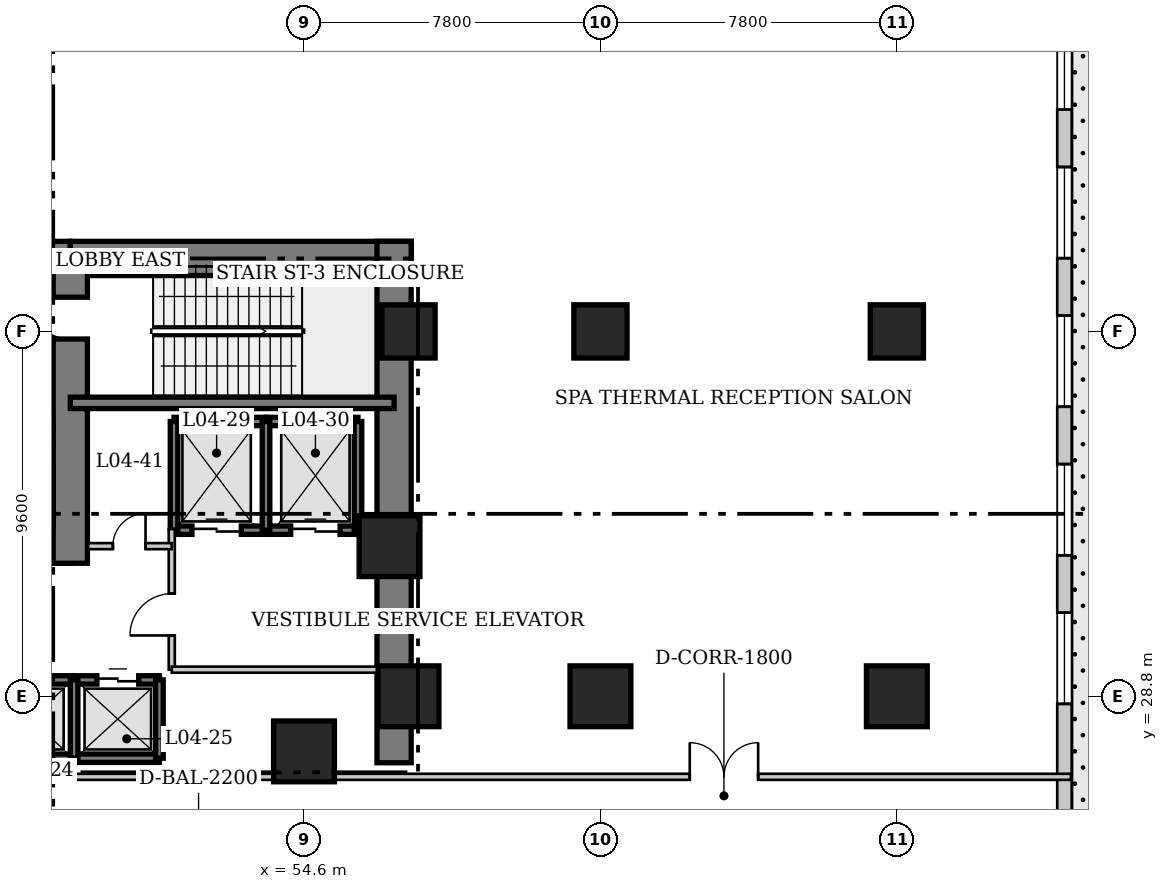
"""IFC4 building model, lengths in metres.
Left out: names, types, materials, properties, quantities, classifications, styles, units other than length and angle.
Written with IfcOpenShell. Run it as: python <this file> out.ifc"""

import sys

from ifc_helpers import new_model, si_unit, direction, frame, frame_2d, origin, origin_2d, place, context, subcontext, project, spatial, rectangle, extrude, element, fill, save


model = new_model("IFC4")
c1 = context("Model", 3, precision=1e-05, world=origin(), true_north=direction((0.0, 1.0)))
c2 = subcontext(c1, "Body", "Model", "MODEL_VIEW")
j1 = project(units=[si_unit("LENGTHUNIT", "METRE"), si_unit("PLANEANGLEUNIT", "RADIAN")], contexts=[c1])
p1 = place(None, origin())
s1 = spatial("IfcSite", under=j1, at=p1, CompositionType="ELEMENT")
p2 = place(p1, origin())
s2 = spatial("IfcBuilding", under=s1, at=p2, CompositionType="ELEMENT")
p3 = place(p2, frame((0.0, 0.0, 20.8)))
s3 = spatial("IfcBuildingStorey", under=s2, at=p3, CompositionType="ELEMENT", Elevation=20.8)
p4 = place(p3, frame((35.85, 40.32, 0.0), z_axis=(0.0, 0.0, 1.0), x_axis=(1.0, 0.0, 0.0)))
e1 = element("IfcWall", 1, at=p4, inside=s3, PredefinedType="SHEAR", context=c2, shape_type="SweptSolid", body=[
    extrude(rectangle(XDim=12.6, YDim=0.9, at=frame_2d((6.3, 0.0))), origin(), (0.0, 0.0, 1.0), 5.2),
])
p5 = place(p3, frame((48.45, 40.32, 0.0), z_axis=(0.0, 0.0, 1.0), x_axis=(1.0, 0.0, 0.0)))
e2 = element("IfcWall", 2, at=p5, inside=s3, PredefinedType="SHEAR", context=c2, shape_type="SweptSolid", body=[
    extrude(rectangle(XDim=8.97, YDim=0.9, at=frame_2d((4.485, 0.0))), origin(), (0.0, 0.0, 1.0), 5.2),
])
p6 = place(p3, frame((56.97, 27.05, 0.0), z_axis=(0.0, 0.0, 1.0), x_axis=(0.0, 1.0, 0.0)))
e3 = element("IfcWall", 3, at=p6, inside=s3, PredefinedType="SHEAR", context=c2, shape_type="SweptSolid", body=[
    extrude(rectangle(XDim=13.72, YDim=0.9, at=frame_2d((6.86, 0.0))), origin(), (0.0, 0.0, 1.0), 5.2),
])
p7 = place(p3, frame((45.81, 32.75, 0.0), z_axis=(0.0, 0.0, 1.0), x_axis=(1.0, 0.0, 0.0)))
e4 = element("IfcWall", 4, at=p7, inside=s3, PredefinedType="SHEAR", context=c2, shape_type="SweptSolid", body=[
    extrude(rectangle(XDim=2.64, YDim=0.9, at=frame_2d((1.32, 0.0))), origin(), (0.0, 0.0, 1.0), 5.2),
])
p8 = place(p3, frame((48.45, 32.3, 0.0), z_axis=(0.0, 0.0, 1.0), x_axis=(0.0, 1.0, 0.0)))
e5 = element("IfcWall", 5, at=p8, inside=s3, PredefinedType="SHEAR", context=c2, shape_type="SweptSolid", body=[
    extrude(rectangle(XDim=8.02, YDim=0.9, at=frame_2d((4.01, 0.0))), origin(), (0.0, 0.0, 1.0), 5.2),
])
p9 = place(p8, frame((5.9, 0.0, 0.0)))
e6 = element("IfcOpeningElement", 6, at=p9, cuts=e5, PredefinedType="OPENING", context=c2, shape_type="SweptSolid", body=[
    extrude(rectangle(XDim=1.1, YDim=2.15, at=frame_2d((0.55, 1.075))), frame((0.0, 0.46, 0.0), z_axis=(0.0, -1.0, 0.0), x_axis=(1.0, 0.0, 0.0)), (0.0, 0.0, 1.0), 0.92),
])
p10 = place(p3, frame((48.45, 36.52, 0.0), z_axis=(0.0, 0.0, 1.0), x_axis=(1.0, 0.0, 0.0)))
e7 = element("IfcWall", 7, at=p10, inside=s3, PredefinedType="SHEAR", context=c2, shape_type="SweptSolid", body=[
    extrude(rectangle(XDim=8.52, YDim=0.3, at=frame_2d((4.26, 0.0))), origin(), (0.0, 0.0, 1.0), 5.2),
])
p11 = place(p3, frame((62.4, 28.8, 0.0), z_axis=(0.0, 0.0, 1.0), x_axis=(1.0, 0.0, 0.0)))
e8 = element("IfcColumn", 8, at=p11, inside=s3, PredefinedType="COLUMN", context=c2, shape_type="SweptSolid", body=[
    extrude(rectangle(XDim=1.6, YDim=1.6, at=origin_2d()), origin(), (0.0, 0.0, 1.0), 5.2),
])
p12 = place(p3, frame((62.4, 38.4, 0.0), z_axis=(0.0, 0.0, 1.0), x_axis=(1.0, 0.0, 0.0)))
e9 = element("IfcColumn", 9, at=p12, inside=s3, PredefinedType="COLUMN", context=c2, shape_type="SweptSolid", body=[
    extrude(rectangle(XDim=1.4, YDim=1.4, at=origin_2d()), origin(), (0.0, 0.0, 1.0), 5.2),
])
p13 = place(p3, frame((70.2, 28.8, 0.0), z_axis=(0.0, 0.0, 1.0), x_axis=(1.0, 0.0, 0.0)))
e10 = element("IfcColumn", 10, at=p13, inside=s3, PredefinedType="COLUMN", context=c2, shape_type="SweptSolid", body=[
    extrude(rectangle(XDim=1.6, YDim=1.6, at=origin_2d()), origin(), (0.0, 0.0, 1.0), 5.2),
])
p14 = place(p3, frame((70.2, 38.4, 0.0), z_axis=(0.0, 0.0, 1.0), x_axis=(1.0, 0.0, 0.0)))
e11 = element("IfcColumn", 11, at=p14, inside=s3, PredefinedType="COLUMN", context=c2, shape_type="SweptSolid", body=[
    extrude(rectangle(XDim=1.4, YDim=1.4, at=origin_2d()), origin(), (0.0, 0.0, 1.0), 5.2),
])
p15 = place(p3, frame((57.35, 28.8, 0.0), z_axis=(0.0, 0.0, 1.0), x_axis=(1.0, 0.0, 0.0)))
e12 = element("IfcColumn", 12, at=p15, inside=s3, PredefinedType="COLUMN", context=c2, shape_type="SweptSolid", body=[
    extrude(rectangle(XDim=1.6, YDim=1.6, at=origin_2d()), origin(), (0.0, 0.0, 1.0), 5.2),
])
p16 = place(p3, frame((57.35, 38.4, 0.0), z_axis=(0.0, 0.0, 1.0), x_axis=(1.0, 0.0, 0.0)))
e13 = element("IfcColumn", 13, at=p16, inside=s3, PredefinedType="COLUMN", context=c2, shape_type="SweptSolid", body=[
    extrude(rectangle(XDim=1.4, YDim=1.4, at=origin_2d()), origin(), (0.0, 0.0, 1.0), 5.2),
])
for number, where, z_axis, x_axis in (
    (14, (54.6, 27.35, 0.0), (0.0, 0.0, 1.0), (1.0, 0.0, 0.0)),
    (15, (56.85, 32.75, 0.0), (0.0, 0.0, 1.0), (1.0, 0.0, 0.0)),
):
    element("IfcColumn", number, at=place(p3, frame(where, z_axis=z_axis, x_axis=x_axis)), inside=s3, PredefinedType="COLUMN", context=c2, shape_type="SweptSolid", body=[
        extrude(rectangle(XDim=1.6, YDim=1.6, at=origin_2d()), origin(), (0.0, 0.0, 1.0), 5.2),
    ])
p17 = place(p3, frame((74.61, 12.21, 0.0), z_axis=(0.0, 0.0, 1.0), x_axis=(0.0, 1.0, 0.0)))
e16 = element("IfcWall", 16, at=p17, inside=s3, PredefinedType="SOLIDWALL", context=c2, shape_type="SweptSolid", body=[
    extrude(rectangle(XDim=35.18, YDim=0.38, at=frame_2d((17.59, 0.0))), origin(), (0.0, 0.0, 1.0), 4.94),
])
p18 = place(p17, frame((0.754, 0.0, 0.75)))
e17 = element("IfcOpeningElement", 17, at=p18, cuts=e16, PredefinedType="OPENING", context=c2, shape_type="SweptSolid", body=[
    extrude(rectangle(XDim=2.4, YDim=2.2, at=frame_2d((1.2, 1.1))), frame((0.0, 0.2, 0.0), z_axis=(0.0, -1.0, 0.0), x_axis=(1.0, 0.0, 0.0)), (0.0, 0.0, 1.0), 0.4),
])
p19 = place(p17, frame((4.663, 0.0, 0.75)))
e18 = element("IfcOpeningElement", 18, at=p19, cuts=e16, PredefinedType="OPENING", context=c2, shape_type="SweptSolid", body=[
    extrude(rectangle(XDim=2.4, YDim=2.2, at=frame_2d((1.2, 1.1))), frame((0.0, 0.2, 0.0), z_axis=(0.0, -1.0, 0.0), x_axis=(1.0, 0.0, 0.0)), (0.0, 0.0, 1.0), 0.4),
])
p20 = place(p17, frame((8.572, 0.0, 0.75)))
e19 = element("IfcOpeningElement", 19, at=p20, cuts=e16, PredefinedType="OPENING", context=c2, shape_type="SweptSolid", body=[
    extrude(rectangle(XDim=2.4, YDim=2.2, at=frame_2d((1.2, 1.1))), frame((0.0, 0.2, 0.0), z_axis=(0.0, -1.0, 0.0), x_axis=(1.0, 0.0, 0.0)), (0.0, 0.0, 1.0), 0.4),
])
p21 = place(p17, frame((16.39, 0.0, 0.75)))
e20 = element("IfcOpeningElement", 20, at=p21, cuts=e16, PredefinedType="OPENING", context=c2, shape_type="SweptSolid", body=[
    extrude(rectangle(XDim=2.4, YDim=2.2, at=frame_2d((1.2, 1.1))), frame((0.0, 0.2, 0.0), z_axis=(0.0, -1.0, 0.0), x_axis=(1.0, 0.0, 0.0)), (0.0, 0.0, 1.0), 0.4),
])
p22 = place(p17, frame((20.299, 0.0, 0.75)))
e21 = element("IfcOpeningElement", 21, at=p22, cuts=e16, PredefinedType="OPENING", context=c2, shape_type="SweptSolid", body=[
    extrude(rectangle(XDim=2.4, YDim=2.2, at=frame_2d((1.2, 1.1))), frame((0.0, 0.2, 0.0), z_axis=(0.0, -1.0, 0.0), x_axis=(1.0, 0.0, 0.0)), (0.0, 0.0, 1.0), 0.4),
])
p23 = place(p17, frame((24.208, 0.0, 0.75)))
e22 = element("IfcOpeningElement", 22, at=p23, cuts=e16, PredefinedType="OPENING", context=c2, shape_type="SweptSolid", body=[
    extrude(rectangle(XDim=2.4, YDim=2.2, at=frame_2d((1.2, 1.1))), frame((0.0, 0.2, 0.0), z_axis=(0.0, -1.0, 0.0), x_axis=(1.0, 0.0, 0.0)), (0.0, 0.0, 1.0), 0.4),
])
p24 = place(p17, frame((28.117, 0.0, 0.75)))
e23 = element("IfcOpeningElement", 23, at=p24, cuts=e16, PredefinedType="OPENING", context=c2, shape_type="SweptSolid", body=[
    extrude(rectangle(XDim=2.4, YDim=2.2, at=frame_2d((1.2, 1.1))), frame((0.0, 0.2, 0.0), z_axis=(0.0, -1.0, 0.0), x_axis=(1.0, 0.0, 0.0)), (0.0, 0.0, 1.0), 0.4),
])
p25 = place(p17, frame((32.026, 0.0, 0.75)))
e24 = element("IfcOpeningElement", 24, at=p25, cuts=e16, PredefinedType="OPENING", context=c2, shape_type="SweptSolid", body=[
    extrude(rectangle(XDim=2.4, YDim=2.2, at=frame_2d((1.2, 1.1))), frame((0.0, 0.2, 0.0), z_axis=(0.0, -1.0, 0.0), x_axis=(1.0, 0.0, 0.0)), (0.0, 0.0, 1.0), 0.4),
])
p26 = place(p3, frame((46.25, 29.23, 0.0), z_axis=(0.0, 0.0, 1.0), x_axis=(1.0, 0.0, 0.0)))
e25 = element("IfcWall", 25, at=p26, inside=s3, PredefinedType="SHEAR", context=c2, shape_type="SweptSolid", body=[
    extrude(rectangle(XDim=2.3, YDim=0.22, at=frame_2d((1.15, 0.0))), origin(), (0.0, 0.0, 1.0), 5.2),
])
p27 = place(p26, frame((0.6, 0.0, 0.0)))
e26 = element("IfcOpeningElement", 26, at=p27, cuts=e25, PredefinedType="OPENING", context=c2, shape_type="SweptSolid", body=[
    extrude(rectangle(XDim=1.1, YDim=2.15, at=frame_2d((0.55, 1.075))), frame((0.0, 0.12, 0.0), z_axis=(0.0, -1.0, 0.0), x_axis=(1.0, 0.0, 0.0)), (0.0, 0.0, 1.0), 0.24),
])
p28 = place(p3, frame((46.25, 27.17, 0.0), z_axis=(0.0, 0.0, 1.0), x_axis=(1.0, 0.0, 0.0)))
e27 = element("IfcWall", 27, at=p28, inside=s3, PredefinedType="SHEAR", context=c2, shape_type="SweptSolid", body=[
    extrude(rectangle(XDim=2.3, YDim=0.22, at=frame_2d((1.15, 0.0))), origin(), (0.0, 0.0, 1.0), 5.2),
])
p29 = place(p3, frame((48.55, 29.23, 0.0), z_axis=(0.0, 0.0, 1.0), x_axis=(1.0, 0.0, 0.0)))
e28 = element("IfcWall", 28, at=p29, inside=s3, PredefinedType="SHEAR", context=c2, shape_type="SweptSolid", body=[
    extrude(rectangle(XDim=2.245, YDim=0.22, at=frame_2d((1.123, 0.0))), origin(), (0.0, 0.0, 1.0), 5.2),
])
p30 = place(p29, frame((0.6, 0.0, 0.0)))
e29 = element("IfcOpeningElement", 29, at=p30, cuts=e28, PredefinedType="OPENING", context=c2, shape_type="SweptSolid", body=[
    extrude(rectangle(XDim=1.1, YDim=2.15, at=frame_2d((0.55, 1.075))), frame((0.0, 0.12, 0.0), z_axis=(0.0, -1.0, 0.0), x_axis=(1.0, 0.0, 0.0)), (0.0, 0.0, 1.0), 0.24),
])
p31 = place(p3, frame((48.55, 27.17, 0.0), z_axis=(0.0, 0.0, 1.0), x_axis=(1.0, 0.0, 0.0)))
e30 = element("IfcWall", 30, at=p31, inside=s3, PredefinedType="SHEAR", context=c2, shape_type="SweptSolid", body=[
    extrude(rectangle(XDim=2.245, YDim=0.22, at=frame_2d((1.123, 0.0))), origin(), (0.0, 0.0, 1.0), 5.2),
])
for number, where, z_axis, x_axis in (
    (31, (48.55, 27.17, 0.0), (0.0, 0.0, 1.0), (0.0, 1.0, 0.0)),
    (32, (50.795, 27.17, 0.0), (0.0, 0.0, 1.0), (0.0, 1.0, 0.0)),
):
    element("IfcWall", number, at=place(p3, frame(where, z_axis=z_axis, x_axis=x_axis)), inside=s3, PredefinedType="SHEAR", context=c2, shape_type="SweptSolid", body=[
        extrude(rectangle(XDim=2.06, YDim=0.2, at=frame_2d((1.03, 0.0))), origin(), (0.0, 0.0, 1.0), 5.2),
    ])
p32 = place(p3, frame((51.18, 36.03, 0.0), z_axis=(0.0, 0.0, 1.0), x_axis=(1.0, 0.0, 0.0)))
e33 = element("IfcWall", 33, at=p32, inside=s3, PredefinedType="SHEAR", context=c2, shape_type="SweptSolid", body=[
    extrude(rectangle(XDim=2.42, YDim=0.22, at=frame_2d((1.21, 0.0))), origin(), (0.0, 0.0, 1.0), 5.2),
])
p33 = place(p3, frame((51.18, 33.17, 0.0), z_axis=(0.0, 0.0, 1.0), x_axis=(1.0, 0.0, 0.0)))
e34 = element("IfcWall", 34, at=p33, inside=s3, PredefinedType="SHEAR", context=c2, shape_type="SweptSolid", body=[
    extrude(rectangle(XDim=2.42, YDim=0.22, at=frame_2d((1.21, 0.0))), origin(), (0.0, 0.0, 1.0), 5.2),
])
p34 = place(p33, frame((0.47, 0.0, 0.0)))
e35 = element("IfcOpeningElement", 35, at=p34, cuts=e34, PredefinedType="OPENING", context=c2, shape_type="SweptSolid", body=[
    extrude(rectangle(XDim=1.3, YDim=2.15, at=frame_2d((0.65, 1.075))), frame((0.0, 0.12, 0.0), z_axis=(0.0, -1.0, 0.0), x_axis=(1.0, 0.0, 0.0)), (0.0, 0.0, 1.0), 0.24),
])
p35 = place(p3, frame((51.18, 33.17, 0.0), z_axis=(0.0, 0.0, 1.0), x_axis=(0.0, 1.0, 0.0)))
e36 = element("IfcWall", 36, at=p35, inside=s3, PredefinedType="SHEAR", context=c2, shape_type="SweptSolid", body=[
    extrude(rectangle(XDim=2.86, YDim=0.2, at=frame_2d((1.43, 0.0))), origin(), (0.0, 0.0, 1.0), 5.2),
])
p36 = place(p3, frame((53.6, 36.03, 0.0), z_axis=(0.0, 0.0, 1.0), x_axis=(1.0, 0.0, 0.0)))
e37 = element("IfcWall", 37, at=p36, inside=s3, PredefinedType="SHEAR", context=c2, shape_type="SweptSolid", body=[
    extrude(rectangle(XDim=2.42, YDim=0.22, at=frame_2d((1.21, 0.0))), origin(), (0.0, 0.0, 1.0), 5.2),
])
p37 = place(p3, frame((53.6, 33.17, 0.0), z_axis=(0.0, 0.0, 1.0), x_axis=(1.0, 0.0, 0.0)))
e38 = element("IfcWall", 38, at=p37, inside=s3, PredefinedType="SHEAR", context=c2, shape_type="SweptSolid", body=[
    extrude(rectangle(XDim=2.42, YDim=0.22, at=frame_2d((1.21, 0.0))), origin(), (0.0, 0.0, 1.0), 5.2),
])
p38 = place(p37, frame((0.65, 0.0, 0.0)))
e39 = element("IfcOpeningElement", 39, at=p38, cuts=e38, PredefinedType="OPENING", context=c2, shape_type="SweptSolid", body=[
    extrude(rectangle(XDim=1.3, YDim=2.15, at=frame_2d((0.65, 1.075))), frame((0.0, 0.12, 0.0), z_axis=(0.0, -1.0, 0.0), x_axis=(1.0, 0.0, 0.0)), (0.0, 0.0, 1.0), 0.24),
])
for number, where, z_axis, x_axis in (
    (40, (53.6, 33.17, 0.0), (0.0, 0.0, 1.0), (0.0, 1.0, 0.0)),
    (41, (56.02, 33.17, 0.0), (0.0, 0.0, 1.0), (0.0, 1.0, 0.0)),
):
    element("IfcWall", number, at=place(p3, frame(where, z_axis=z_axis, x_axis=x_axis)), inside=s3, PredefinedType="SHEAR", context=c2, shape_type="SweptSolid", body=[
        extrude(rectangle(XDim=2.86, YDim=0.2, at=frame_2d((1.43, 0.0))), origin(), (0.0, 0.0, 1.0), 5.2),
    ])
p39 = place(p3, frame((47.895, 33.245, 0.0), z_axis=(0.0, 0.0, 1.0), x_axis=(0.0, 1.0, 0.0)))
e42 = element("IfcWall", 42, at=p39, inside=s3, PredefinedType="SHEAR", context=c2, shape_type="SweptSolid", body=[
    extrude(rectangle(XDim=2.91, YDim=0.2, at=frame_2d((1.455, 0.0))), origin(), (0.0, 0.0, 1.0), 5.2),
])
p40 = place(p3, frame((51.12, 29.5, 0.0), z_axis=(0.0, 0.0, 1.0), x_axis=(0.0, 1.0, 0.0)))
e43 = element("IfcWall", 43, at=p40, inside=s3, PredefinedType="PARTITIONING", context=c2, shape_type="SweptSolid", body=[
    extrude(rectangle(XDim=3.7, YDim=0.16, at=frame_2d((1.85, 0.0))), origin(), (0.0, 0.0, 1.0), 4.94),
])
p41 = place(p40, frame((0.9, 0.0, 0.0)))
e44 = element("IfcOpeningElement", 44, at=p41, cuts=e43, PredefinedType="OPENING", context=c2, shape_type="SweptSolid", body=[
    extrude(rectangle(XDim=1.1, YDim=2.15, at=frame_2d((0.55, 1.075))), frame((0.0, 0.09, 0.0), z_axis=(0.0, -1.0, 0.0), x_axis=(1.0, 0.0, 0.0)), (0.0, 0.0, 1.0), 0.18),
])
p42 = place(p3, frame((51.12, 29.5, 0.0), z_axis=(0.0, 0.0, 1.0), x_axis=(1.0, 0.0, 0.0)))
e45 = element("IfcWall", 45, at=p42, inside=s3, PredefinedType="PARTITIONING", context=c2, shape_type="SweptSolid", body=[
    extrude(rectangle(XDim=5.63, YDim=0.16, at=frame_2d((2.815, 0.0))), origin(), (0.0, 0.0, 1.0), 4.94),
])
p43 = place(p3, frame((48.92, 32.75, 0.0), z_axis=(0.0, 0.0, 1.0), x_axis=(1.0, 0.0, 0.0)))
e46 = element("IfcWall", 46, at=p43, inside=s3, PredefinedType="PARTITIONING", context=c2, shape_type="SweptSolid", body=[
    extrude(rectangle(XDim=2.2, YDim=0.16, at=frame_2d((1.1, 0.0))), origin(), (0.0, 0.0, 1.0), 4.94),
])
p44 = place(p43, frame((0.65, 0.0, 0.0)))
e47 = element("IfcOpeningElement", 47, at=p44, cuts=e46, PredefinedType="OPENING", context=c2, shape_type="SweptSolid", body=[
    extrude(rectangle(XDim=0.86, YDim=2.05, at=frame_2d((0.43, 1.025))), frame((0.0, 0.09, 0.0), z_axis=(0.0, -1.0, 0.0), x_axis=(1.0, 0.0, 0.0)), (0.0, 0.0, 1.0), 0.18),
])
p45 = place(p3, frame((3.22, 26.68, 0.0), z_axis=(0.0, 0.0, 1.0), x_axis=(1.0, 0.0, 0.0)))
e48 = element("IfcWall", 48, at=p45, inside=s3, PredefinedType="PARTITIONING", context=c2, shape_type="SweptSolid", body=[
    extrude(rectangle(XDim=71.56, YDim=0.16, at=frame_2d((35.78, 0.0))), origin(), (0.0, 0.0, 1.0), 4.94),
])
p46 = place(p45, frame((34.88, 0.0, 0.0)))
e49 = element("IfcOpeningElement", 49, at=p46, cuts=e48, PredefinedType="OPENING", context=c2, shape_type="SweptSolid", body=[
    extrude(rectangle(XDim=1.8, YDim=2.2, at=frame_2d((0.9, 1.1))), frame((0.0, 0.09, 0.0), z_axis=(0.0, -1.0, 0.0), x_axis=(1.0, 0.0, 0.0)), (0.0, 0.0, 1.0), 0.18),
])
p47 = place(p45, frame((8.63, 0.0, 0.0)))
e50 = element("IfcOpeningElement", 50, at=p47, cuts=e48, PredefinedType="OPENING", context=c2, shape_type="SweptSolid", body=[
    extrude(rectangle(XDim=1.8, YDim=2.2, at=frame_2d((0.9, 1.1))), frame((0.0, 0.09, 0.0), z_axis=(0.0, -1.0, 0.0), x_axis=(1.0, 0.0, 0.0)), (0.0, 0.0, 1.0), 0.18),
])
p48 = place(p45, frame((61.53, 0.0, 0.0)))
e51 = element("IfcOpeningElement", 51, at=p48, cuts=e48, PredefinedType="OPENING", context=c2, shape_type="SweptSolid", body=[
    extrude(rectangle(XDim=1.8, YDim=2.2, at=frame_2d((0.9, 1.1))), frame((0.0, 0.09, 0.0), z_axis=(0.0, -1.0, 0.0), x_axis=(1.0, 0.0, 0.0)), (0.0, 0.0, 1.0), 0.18),
])
p49 = place(p21, origin())
e52 = element("IfcWindow", 52, at=p49, inside=s3, PartitioningType="SINGLE_PANEL", PredefinedType="WINDOW", context=c2, shape_type="SweptSolid", body=[
    extrude(rectangle(XDim=2.4, YDim=2.2, at=frame_2d((1.2, 1.1))), frame((0.0, 0.03, 0.0), z_axis=(0.0, -1.0, 0.0), x_axis=(1.0, 0.0, 0.0)), (0.0, 0.0, 1.0), 0.06),
])
fill(e20, e52)
p50 = place(p22, origin())
e53 = element("IfcWindow", 53, at=p50, inside=s3, PartitioningType="SINGLE_PANEL", PredefinedType="WINDOW", context=c2, shape_type="SweptSolid", body=[
    extrude(rectangle(XDim=2.4, YDim=2.2, at=frame_2d((1.2, 1.1))), frame((0.0, 0.03, 0.0), z_axis=(0.0, -1.0, 0.0), x_axis=(1.0, 0.0, 0.0)), (0.0, 0.0, 1.0), 0.06),
])
fill(e21, e53)
p51 = place(p23, origin())
e54 = element("IfcWindow", 54, at=p51, inside=s3, PartitioningType="SINGLE_PANEL", PredefinedType="WINDOW", context=c2, shape_type="SweptSolid", body=[
    extrude(rectangle(XDim=2.4, YDim=2.2, at=frame_2d((1.2, 1.1))), frame((0.0, 0.03, 0.0), z_axis=(0.0, -1.0, 0.0), x_axis=(1.0, 0.0, 0.0)), (0.0, 0.0, 1.0), 0.06),
])
fill(e22, e54)
p52 = place(p24, origin())
e55 = element("IfcWindow", 55, at=p52, inside=s3, PartitioningType="SINGLE_PANEL", PredefinedType="WINDOW", context=c2, shape_type="SweptSolid", body=[
    extrude(rectangle(XDim=2.4, YDim=2.2, at=frame_2d((1.2, 1.1))), frame((0.0, 0.03, 0.0), z_axis=(0.0, -1.0, 0.0), x_axis=(1.0, 0.0, 0.0)), (0.0, 0.0, 1.0), 0.06),
])
fill(e23, e55)
p53 = place(p25, origin())
e56 = element("IfcWindow", 56, at=p53, inside=s3, PartitioningType="SINGLE_PANEL", PredefinedType="WINDOW", context=c2, shape_type="SweptSolid", body=[
    extrude(rectangle(XDim=2.4, YDim=2.2, at=frame_2d((1.2, 1.1))), frame((0.0, 0.03, 0.0), z_axis=(0.0, -1.0, 0.0), x_axis=(1.0, 0.0, 0.0)), (0.0, 0.0, 1.0), 0.06),
])
fill(e24, e56)
p54 = place(p30, origin())
e57 = element("IfcDoor", 57, at=p54, inside=s3, OperationType="DOUBLE_DOOR_SLIDING", PredefinedType="DOOR", context=c2, shape_type="SweptSolid", body=[
    extrude(rectangle(XDim=1.1, YDim=2.15, at=frame_2d((0.55, 1.075))), frame((0.0, 0.025, 0.0), z_axis=(0.0, -1.0, 0.0), x_axis=(1.0, 0.0, 0.0)), (0.0, 0.0, 1.0), 0.05),
])
fill(e29, e57)
p55 = place(p34, origin())
e58 = element("IfcDoor", 58, at=p55, inside=s3, OperationType="DOUBLE_DOOR_SLIDING", PredefinedType="DOOR", context=c2, shape_type="SweptSolid", body=[
    extrude(rectangle(XDim=1.3, YDim=2.15, at=frame_2d((0.65, 1.075))), frame((0.0, 0.025, 0.0), z_axis=(0.0, -1.0, 0.0), x_axis=(1.0, 0.0, 0.0)), (0.0, 0.0, 1.0), 0.05),
])
fill(e35, e58)
p56 = place(p38, origin())
e59 = element("IfcDoor", 59, at=p56, inside=s3, OperationType="DOUBLE_DOOR_SLIDING", PredefinedType="DOOR", context=c2, shape_type="SweptSolid", body=[
    extrude(rectangle(XDim=1.3, YDim=2.15, at=frame_2d((0.65, 1.075))), frame((0.0, 0.025, 0.0), z_axis=(0.0, -1.0, 0.0), x_axis=(1.0, 0.0, 0.0)), (0.0, 0.0, 1.0), 0.05),
])
fill(e39, e59)
p57 = place(p41, origin())
e60 = element("IfcDoor", 60, at=p57, inside=s3, OperationType="SINGLE_SWING_LEFT", PredefinedType="DOOR", context=c2, shape_type="SweptSolid", body=[
    extrude(rectangle(XDim=1.1, YDim=2.15, at=frame_2d((0.55, 1.075))), frame((0.0, 0.025, 0.0), z_axis=(0.0, -1.0, 0.0), x_axis=(1.0, 0.0, 0.0)), (0.0, 0.0, 1.0), 0.05),
])
fill(e44, e60)
p58 = place(p44, origin())
e61 = element("IfcDoor", 61, at=p58, inside=s3, OperationType="SINGLE_SWING_RIGHT", PredefinedType="DOOR", context=c2, shape_type="SweptSolid", body=[
    extrude(rectangle(XDim=0.86, YDim=2.05, at=frame_2d((0.43, 1.025))), frame((0.0, 0.025, 0.0), z_axis=(0.0, -1.0, 0.0), x_axis=(1.0, 0.0, 0.0)), (0.0, 0.0, 1.0), 0.05),
])
fill(e47, e61)
p59 = place(p48, origin())
e62 = element("IfcDoor", 62, at=p59, inside=s3, OperationType="DOUBLE_DOOR_SINGLE_SWING", PredefinedType="DOOR", context=c2, shape_type="SweptSolid", body=[
    extrude(rectangle(XDim=1.8, YDim=2.2, at=frame_2d((0.9, 1.1))), frame((0.0, 0.025, 0.0), z_axis=(0.0, -1.0, 0.0), x_axis=(1.0, 0.0, 0.0)), (0.0, 0.0, 1.0), 0.05),
])
fill(e51, e62)
p60 = place(p9, origin())
e63 = element("IfcDoor", 63, at=p60, inside=s3, OperationType="SINGLE_SWING_RIGHT", PredefinedType="DOOR", context=c2, shape_type="SweptSolid", body=[
    extrude(rectangle(XDim=1.1, YDim=2.15, at=frame_2d((0.55, 1.075))), frame((0.0, 0.025, 0.0), z_axis=(0.0, -1.0, 0.0), x_axis=(1.0, 0.0, 0.0)), (0.0, 0.0, 1.0), 0.05),
])
fill(e6, e63)
save(model, sys.argv[1])
